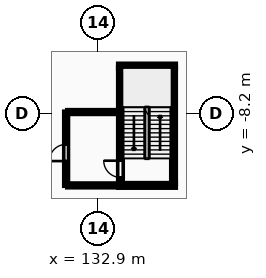
"""IFC4 building model, lengths in metres.
Left out: names, types, materials, properties, quantities, classifications, styles, units other than length and angle.
Written with IfcOpenShell. Run it as: python <this file> out.ifc"""

import sys

from ifc_helpers import new_model, si_unit, direction, frame, frame_2d, origin, place, context, subcontext, project, spatial, rectangle, extrude, element, fill, save


model = new_model("IFC4")
c1 = context("Model", 3, precision=1e-05, world=origin(), true_north=direction((0.0, 1.0)))
c2 = subcontext(c1, "Body", "Model", "MODEL_VIEW")
j1 = project(units=[si_unit("LENGTHUNIT", "METRE"), si_unit("PLANEANGLEUNIT", "RADIAN")], contexts=[c1])
p1 = place(None, origin())
s1 = spatial("IfcSite", under=j1, at=p1, CompositionType="ELEMENT")
p2 = place(p1, origin())
s2 = spatial("IfcBuilding", under=s1, at=p2, CompositionType="ELEMENT")
p3 = place(p2, frame((0.0, 0.0, 5.4)))
s3 = spatial("IfcBuildingStorey", under=s2, at=p3, CompositionType="ELEMENT", Elevation=5.4)
p4 = place(p3, frame((134.375, -12.8, 0.0), z_axis=(0.0, 0.0, 1.0), x_axis=(0.0, 1.0, 0.0)))
e1 = element("IfcWall", 1, at=p4, inside=s3, PredefinedType="SHEAR", context=c2, shape_type="SweptSolid", body=[
    extrude(rectangle(XDim=7.6, YDim=0.25, at=frame_2d((3.8, 0.0))), origin(), (0.0, 0.0, 1.0), 4.6),
])
p5 = place(p4, frame((0.4, 0.0, 0.0)))
e2 = element("IfcOpeningElement", 2, at=p5, cuts=e1, PredefinedType="OPENING", context=c2, shape_type="SweptSolid", body=[
    extrude(rectangle(XDim=1.1, YDim=2.1, at=frame_2d((0.55, 1.05))), frame((0.0, 0.135, 0.0), z_axis=(0.0, -1.0, 0.0), x_axis=(1.0, 0.0, 0.0)), (0.0, 0.0, 1.0), 0.27),
])
p6 = place(p3, frame((137.865, -12.8, 0.0), z_axis=(0.0, 0.0, 1.0), x_axis=(0.0, 1.0, 0.0)))
e3 = element("IfcWall", 3, at=p6, inside=s3, PredefinedType="SHEAR", context=c2, shape_type="SweptSolid", body=[
    extrude(rectangle(XDim=7.6, YDim=0.25, at=frame_2d((3.8, 0.0))), origin(), (0.0, 0.0, 1.0), 4.6),
])
for number, where, z_axis, x_axis in (
    (4, (134.25, -12.925, 0.0), (0.0, 0.0, 1.0), (1.0, 0.0, 0.0)),
    (5, (134.25, -5.075, 0.0), (0.0, 0.0, 1.0), (1.0, 0.0, 0.0)),
):
    element("IfcWall", number, at=place(p3, frame(where, z_axis=z_axis, x_axis=x_axis)), inside=s3, PredefinedType="SHEAR", context=c2, shape_type="SweptSolid", body=[
        extrude(rectangle(XDim=3.74, YDim=0.25, at=frame_2d((1.87, 0.0))), origin(), (0.0, 0.0, 1.0), 4.6),
    ])
p7 = place(p3, frame((130.8, -12.925, 0.0), z_axis=(0.0, 0.0, 1.0), x_axis=(0.0, 1.0, 0.0)))
e6 = element("IfcWall", 6, at=p7, inside=s3, PredefinedType="PARTITIONING", context=c2, shape_type="SweptSolid", body=[
    extrude(rectangle(XDim=4.825, YDim=0.2, at=frame_2d((2.413, 0.0))), origin(), (0.0, 0.0, 1.0), 4.3),
])
p8 = place(p7, frame((1.6, 0.0, 0.0)))
e7 = element("IfcOpeningElement", 7, at=p8, cuts=e6, PredefinedType="OPENING", context=c2, shape_type="SweptSolid", body=[
    extrude(rectangle(XDim=1.1, YDim=2.15, at=frame_2d((0.55, 1.075))), frame((0.0, 0.11, 0.0), z_axis=(0.0, -1.0, 0.0), x_axis=(1.0, 0.0, 0.0)), (0.0, 0.0, 1.0), 0.22),
])
for number, where, z_axis, x_axis in (
    (8, (130.9, -12.925, 0.0), (0.0, 0.0, 1.0), (1.0, 0.0, 0.0)),
    (9, (130.9, -8.1, 0.0), (0.0, 0.0, 1.0), (1.0, 0.0, 0.0)),
):
    element("IfcWall", number, at=place(p3, frame(where, z_axis=z_axis, x_axis=x_axis)), inside=s3, PredefinedType="PARTITIONING", context=c2, shape_type="SweptSolid", body=[
        extrude(rectangle(XDim=3.35, YDim=0.2, at=frame_2d((1.675, 0.0))), origin(), (0.0, 0.0, 1.0), 4.3),
    ])
p9 = place(p5, origin())
e10 = element("IfcDoor", 10, at=p9, inside=s3, OperationType="SINGLE_SWING_RIGHT", PredefinedType="DOOR", context=c2, shape_type="SweptSolid", body=[
    extrude(rectangle(XDim=1.1, YDim=2.1, at=frame_2d((0.55, 1.05))), frame((0.0, 0.025, 0.0), z_axis=(0.0, -1.0, 0.0), x_axis=(1.0, 0.0, 0.0)), (0.0, 0.0, 1.0), 0.05),
])
fill(e2, e10)
p10 = place(p8, origin())
e11 = element("IfcDoor", 11, at=p10, inside=s3, OperationType="SINGLE_SWING_LEFT", PredefinedType="DOOR", context=c2, shape_type="SweptSolid", body=[
    extrude(rectangle(XDim=1.1, YDim=2.15, at=frame_2d((0.55, 1.075))), frame((0.0, 0.025, 0.0), z_axis=(0.0, -1.0, 0.0), x_axis=(1.0, 0.0, 0.0)), (0.0, 0.0, 1.0), 0.05),
])
fill(e7, e11)
save(model, sys.argv[1])
